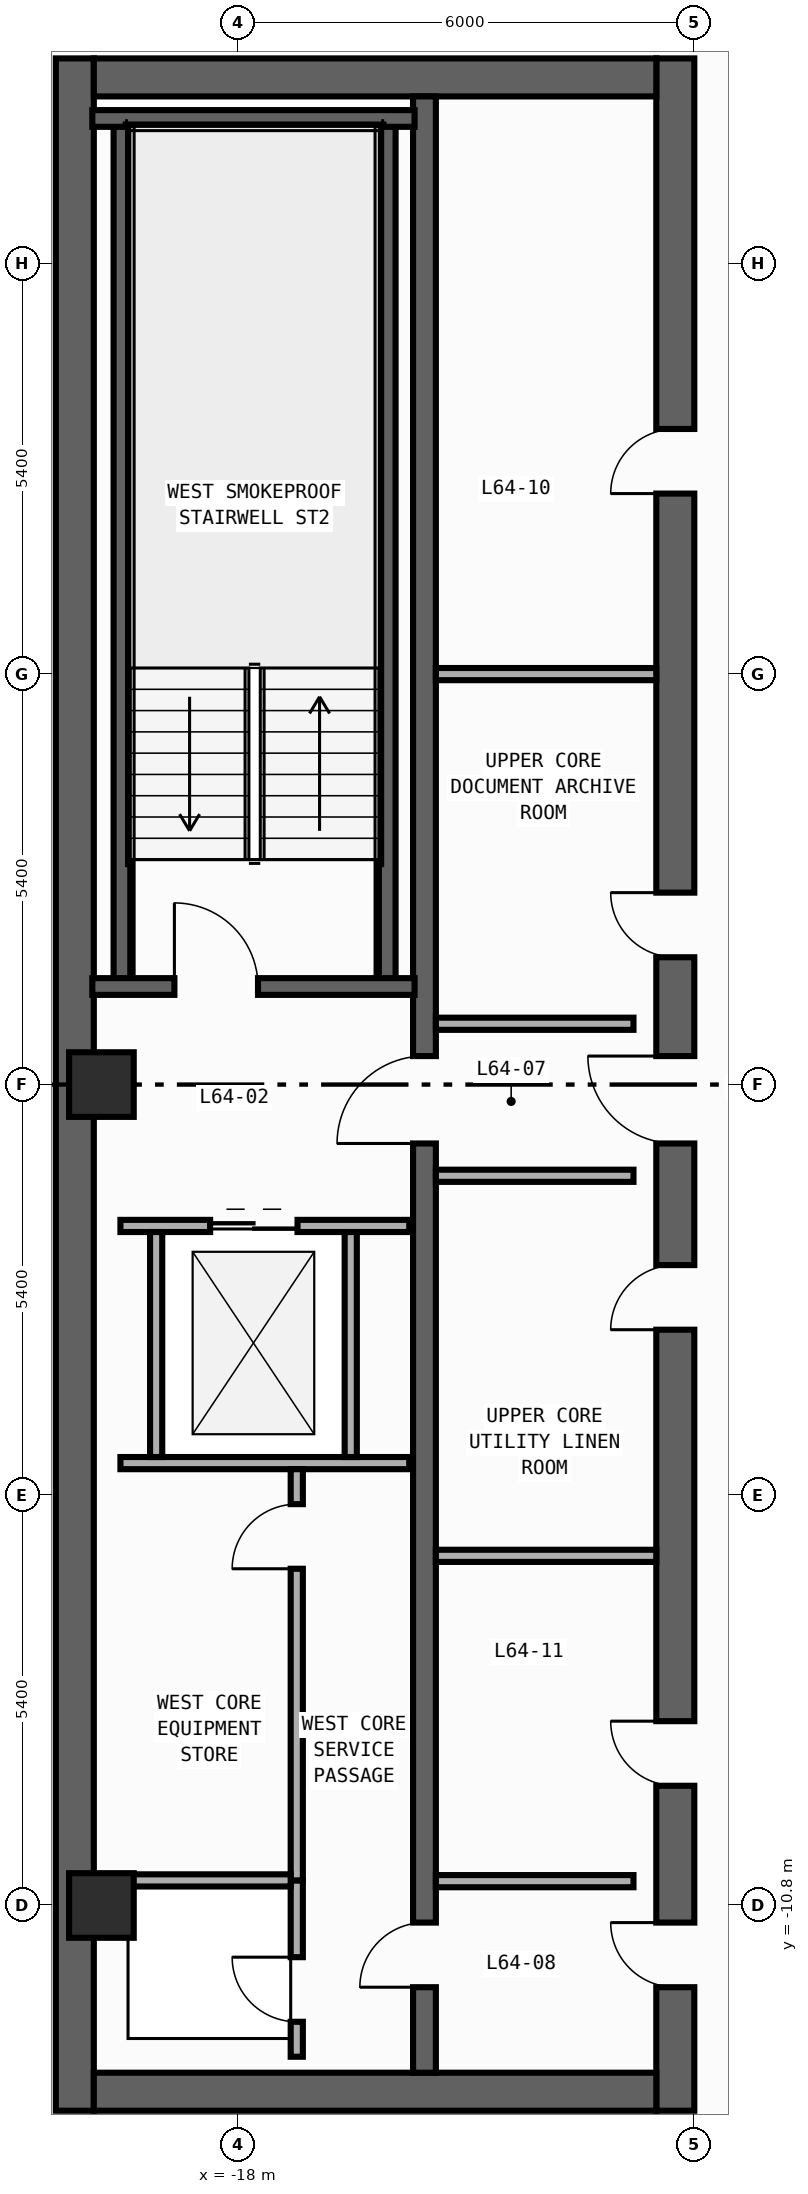
"""IFC4 building model, lengths in metres.
Left out: names, types, materials, properties, quantities, classifications, styles, units other than length and angle.
Written with IfcOpenShell. Run it as: python <this file> out.ifc"""

import sys

from ifc_helpers import new_model, si_unit, direction, frame, frame_2d, origin, origin_2d, place, context, subcontext, project, spatial, rectangle, extrude, element, fill, save


model = new_model("IFC4")
c1 = context("Model", 3, precision=1e-05, world=origin(), true_north=direction((0.0, 1.0)))
c2 = subcontext(c1, "Body", "Model", "MODEL_VIEW")
j1 = project(units=[si_unit("LENGTHUNIT", "METRE"), si_unit("PLANEANGLEUNIT", "RADIAN")], contexts=[c1])
p1 = place(None, origin())
s1 = spatial("IfcSite", under=j1, at=p1, CompositionType="ELEMENT")
p2 = place(p1, origin())
s2 = spatial("IfcBuilding", under=s1, at=p2, CompositionType="ELEMENT")
p3 = place(p2, frame((0.0, 0.0, 269.2)))
s3 = spatial("IfcBuildingStorey", under=s2, at=p3, CompositionType="ELEMENT", Elevation=269.2)
p4 = place(p3, frame((-20.15, -13.5, 0.0), z_axis=(0.0, 0.0, 1.0), x_axis=(0.0, 1.0, 0.0)))
e1 = element("IfcWall", 1, at=p4, inside=s3, PredefinedType="SHEAR", context=c2, shape_type="SweptSolid", body=[
    extrude(rectangle(XDim=27.0, YDim=0.5, at=frame_2d((13.5, 0.0))), origin(), (0.0, 0.0, 1.0), 3.25),
])
p5 = place(p3, frame((-12.25, -13.5, 0.0), z_axis=(0.0, 0.0, 1.0), x_axis=(0.0, 1.0, 0.0)))
e2 = element("IfcWall", 2, at=p5, inside=s3, PredefinedType="SHEAR", context=c2, shape_type="SweptSolid", body=[
    extrude(rectangle(XDim=27.0, YDim=0.5, at=frame_2d((13.5, 0.0))), origin(), (0.0, 0.0, 1.0), 3.25),
])
p6 = place(p5, frame((15.175, 0.0, 0.0)))
e3 = element("IfcOpeningElement", 3, at=p6, cuts=e2, PredefinedType="OPENING", context=c2, shape_type="SweptSolid", body=[
    extrude(rectangle(XDim=0.85, YDim=2.1, at=frame_2d((0.425, 1.05))), frame((0.0, 0.26, 0.0), z_axis=(0.0, -1.0, 0.0), x_axis=(1.0, 0.0, 0.0)), (0.0, 0.0, 1.0), 0.52),
])
p7 = place(p5, frame((21.275, 0.0, 0.0)))
e4 = element("IfcOpeningElement", 4, at=p7, cuts=e2, PredefinedType="OPENING", context=c2, shape_type="SweptSolid", body=[
    extrude(rectangle(XDim=0.85, YDim=2.1, at=frame_2d((0.425, 1.05))), frame((0.0, 0.26, 0.0), z_axis=(0.0, -1.0, 0.0), x_axis=(1.0, 0.0, 0.0)), (0.0, 0.0, 1.0), 0.52),
])
p8 = place(p5, frame((4.275, 0.0, 0.0)))
e5 = element("IfcOpeningElement", 5, at=p8, cuts=e2, PredefinedType="OPENING", context=c2, shape_type="SweptSolid", body=[
    extrude(rectangle(XDim=0.85, YDim=2.1, at=frame_2d((0.425, 1.05))), frame((0.0, 0.26, 0.0), z_axis=(0.0, -1.0, 0.0), x_axis=(1.0, 0.0, 0.0)), (0.0, 0.0, 1.0), 0.52),
])
p9 = place(p5, frame((10.275, 0.0, 0.0)))
e6 = element("IfcOpeningElement", 6, at=p9, cuts=e2, PredefinedType="OPENING", context=c2, shape_type="SweptSolid", body=[
    extrude(rectangle(XDim=0.85, YDim=2.1, at=frame_2d((0.425, 1.05))), frame((0.0, 0.26, 0.0), z_axis=(0.0, -1.0, 0.0), x_axis=(1.0, 0.0, 0.0)), (0.0, 0.0, 1.0), 0.52),
])
p10 = place(p5, frame((12.725, 0.0, 0.0)))
e7 = element("IfcOpeningElement", 7, at=p10, cuts=e2, PredefinedType="OPENING", context=c2, shape_type="SweptSolid", body=[
    extrude(rectangle(XDim=1.15, YDim=2.2, at=frame_2d((0.575, 1.1))), frame((0.0, 0.26, 0.0), z_axis=(0.0, -1.0, 0.0), x_axis=(1.0, 0.0, 0.0)), (0.0, 0.0, 1.0), 0.52),
])
p11 = place(p5, frame((1.625, 0.0, 0.0)))
e8 = element("IfcOpeningElement", 8, at=p11, cuts=e2, PredefinedType="OPENING", context=c2, shape_type="SweptSolid", body=[
    extrude(rectangle(XDim=0.85, YDim=2.1, at=frame_2d((0.425, 1.05))), frame((0.0, 0.26, 0.0), z_axis=(0.0, -1.0, 0.0), x_axis=(1.0, 0.0, 0.0)), (0.0, 0.0, 1.0), 0.52),
])
for number, where, z_axis, x_axis in (
    (9, (-19.9, -13.25, 0.0), (0.0, 0.0, 1.0), (1.0, 0.0, 0.0)),
    (10, (-19.9, 13.25, 0.0), (0.0, 0.0, 1.0), (1.0, 0.0, 0.0)),
):
    element("IfcWall", number, at=place(p3, frame(where, z_axis=z_axis, x_axis=x_axis)), inside=s3, PredefinedType="SHEAR", context=c2, shape_type="SweptSolid", body=[
        extrude(rectangle(XDim=7.4, YDim=0.5, at=frame_2d((3.7, 0.0))), origin(), (0.0, 0.0, 1.0), 3.25),
    ])
p12 = place(p3, frame((-15.55, -13.0, 0.0), z_axis=(0.0, 0.0, 1.0), x_axis=(0.0, 1.0, 0.0)))
e11 = element("IfcWall", 11, at=p12, inside=s3, PredefinedType="SHEAR", context=c2, shape_type="SweptSolid", body=[
    extrude(rectangle(XDim=26.0, YDim=0.3, at=frame_2d((13.0, 0.0))), origin(), (0.0, 0.0, 1.0), 3.25),
])
p13 = place(p12, frame((12.225, 0.0, 0.0)))
e12 = element("IfcOpeningElement", 12, at=p13, cuts=e11, PredefinedType="OPENING", context=c2, shape_type="SweptSolid", body=[
    extrude(rectangle(XDim=1.15, YDim=2.2, at=frame_2d((0.575, 1.1))), frame((0.0, 0.16, 0.0), z_axis=(0.0, -1.0, 0.0), x_axis=(1.0, 0.0, 0.0)), (0.0, 0.0, 1.0), 0.32),
])
p14 = place(p12, frame((1.125, 0.0, 0.0)))
e13 = element("IfcOpeningElement", 13, at=p14, cuts=e11, PredefinedType="OPENING", context=c2, shape_type="SweptSolid", body=[
    extrude(rectangle(XDim=0.85, YDim=2.1, at=frame_2d((0.425, 1.05))), frame((0.0, 0.16, 0.0), z_axis=(0.0, -1.0, 0.0), x_axis=(1.0, 0.0, 0.0)), (0.0, 0.0, 1.0), 0.32),
])
for number, where, z_axis, x_axis in (
    (14, (-16.04, 1.29, 0.0), (0.0, 0.0, 1.0), (0.0, 1.0, 0.0)),
    (15, (-19.53, 1.29, 0.0), (0.0, 0.0, 1.0), (0.0, 1.0, 0.0)),
):
    element("IfcWall", number, at=place(p3, frame(where, z_axis=z_axis, x_axis=x_axis)), inside=s3, PredefinedType="SHEAR", context=c2, shape_type="SweptSolid", body=[
        extrude(rectangle(XDim=11.42, YDim=0.22, at=frame_2d((5.71, 0.0))), origin(), (0.0, 0.0, 1.0), 3.25),
    ])
p15 = place(p3, frame((-19.92, 12.71, 0.0), z_axis=(0.0, 0.0, 1.0), x_axis=(1.0, 0.0, 0.0)))
e16 = element("IfcWall", 16, at=p15, inside=s3, PredefinedType="SHEAR", context=c2, shape_type="SweptSolid", body=[
    extrude(rectangle(XDim=4.24, YDim=0.22, at=frame_2d((2.12, 0.0))), origin(), (0.0, 0.0, 1.0), 3.25),
])
p16 = place(p3, frame((-19.92, 1.29, 0.0), z_axis=(0.0, 0.0, 1.0), x_axis=(1.0, 0.0, 0.0)))
e17 = element("IfcWall", 17, at=p16, inside=s3, PredefinedType="SHEAR", context=c2, shape_type="SweptSolid", body=[
    extrude(rectangle(XDim=4.24, YDim=0.22, at=frame_2d((2.12, 0.0))), origin(), (0.0, 0.0, 1.0), 3.25),
])
p17 = place(p16, frame((1.08, 0.0, 0.0)))
e18 = element("IfcOpeningElement", 18, at=p17, cuts=e17, PredefinedType="OPENING", context=c2, shape_type="SweptSolid", body=[
    extrude(rectangle(XDim=1.1, YDim=2.2, at=frame_2d((0.55, 1.1))), frame((0.0, 0.12, 0.0), z_axis=(0.0, -1.0, 0.0), x_axis=(1.0, 0.0, 0.0)), (0.0, 0.0, 1.0), 0.24),
])
for number, where, z_axis, x_axis in (
    (19, (-19.8, -10.8, 0.0), (0.0, 0.0, 1.0), (1.0, 0.0, 0.0)),
    (20, (-19.8, 0.0, 0.0), (0.0, 0.0, 1.0), (1.0, 0.0, 0.0)),
):
    element("IfcColumn", number, at=place(p3, frame(where, z_axis=z_axis, x_axis=x_axis)), inside=s3, PredefinedType="COLUMN", context=c2, shape_type="SweptSolid", body=[
        extrude(rectangle(XDim=0.85, YDim=0.85, at=origin_2d()), origin(), (0.0, 0.0, 1.0), 3.6),
    ])
p18 = place(p3, frame((-19.55, -1.86, 0.0), z_axis=(0.0, 0.0, 1.0), x_axis=(1.0, 0.0, 0.0)))
e21 = element("IfcWall", 21, at=p18, inside=s3, PredefinedType="STANDARD", context=c2, shape_type="SweptSolid", body=[
    extrude(rectangle(XDim=3.8, YDim=0.16, at=frame_2d((1.9, 0.0))), origin(), (0.0, 0.0, 1.0), 3.25),
])
p19 = place(p18, frame((1.18, 0.0, 0.0)))
e22 = element("IfcOpeningElement", 22, at=p19, cuts=e21, PredefinedType="OPENING", context=c2, shape_type="SweptSolid", body=[
    extrude(rectangle(XDim=1.15, YDim=2.2, at=frame_2d((0.575, 1.1))), frame((0.0, 0.09, 0.0), z_axis=(0.0, -1.0, 0.0), x_axis=(1.0, 0.0, 0.0)), (0.0, 0.0, 1.0), 0.18),
])
p20 = place(p3, frame((-19.55, -4.98, 0.0), z_axis=(0.0, 0.0, 1.0), x_axis=(1.0, 0.0, 0.0)))
e23 = element("IfcWall", 23, at=p20, inside=s3, PredefinedType="STANDARD", context=c2, shape_type="SweptSolid", body=[
    extrude(rectangle(XDim=3.8, YDim=0.16, at=frame_2d((1.9, 0.0))), origin(), (0.0, 0.0, 1.0), 3.25),
])
for number, where, z_axis, x_axis in (
    (24, (-19.08, -4.9, 0.0), (0.0, 0.0, 1.0), (0.0, 1.0, 0.0)),
    (25, (-16.52, -4.9, 0.0), (0.0, 0.0, 1.0), (0.0, 1.0, 0.0)),
):
    element("IfcWall", number, at=place(p3, frame(where, z_axis=z_axis, x_axis=x_axis)), inside=s3, PredefinedType="STANDARD", context=c2, shape_type="SweptSolid", body=[
        extrude(rectangle(XDim=2.96, YDim=0.16, at=frame_2d((1.48, 0.0))), origin(), (0.0, 0.0, 1.0), 3.25),
    ])
for number, where, z_axis, x_axis in (
    (26, (-15.4, 0.8, 0.0), (0.0, 0.0, 1.0), (1.0, 0.0, 0.0)),
    (27, (-15.4, -1.2, 0.0), (0.0, 0.0, 1.0), (1.0, 0.0, 0.0)),
    (28, (-15.4, -10.48, 0.0), (0.0, 0.0, 1.0), (1.0, 0.0, 0.0)),
):
    element("IfcWall", number, at=place(p3, frame(where, z_axis=z_axis, x_axis=x_axis)), inside=s3, PredefinedType="STANDARD", context=c2, shape_type="SweptSolid", body=[
        extrude(rectangle(XDim=2.6, YDim=0.16, at=frame_2d((1.3, 0.0))), origin(), (0.0, 0.0, 1.0), 3.25),
    ])
p21 = place(p3, frame((-17.23, -12.79, 0.0), z_axis=(0.0, 0.0, 1.0), x_axis=(0.0, 1.0, 0.0)))
e29 = element("IfcWall", 29, at=p21, inside=s3, PredefinedType="PARTITIONING", context=c2, shape_type="SweptSolid", body=[
    extrude(rectangle(XDim=2.32, YDim=0.16, at=frame_2d((1.16, 0.0))), origin(), (0.0, 0.0, 1.0), 3.25),
])
p22 = place(p21, frame((0.46, 0.0, 0.0)))
e30 = element("IfcOpeningElement", 30, at=p22, cuts=e29, PredefinedType="OPENING", context=c2, shape_type="SweptSolid", body=[
    extrude(rectangle(XDim=0.85, YDim=2.1, at=frame_2d((0.425, 1.05))), frame((0.0, 0.09, 0.0), z_axis=(0.0, -1.0, 0.0), x_axis=(1.0, 0.0, 0.0)), (0.0, 0.0, 1.0), 0.18),
])
p23 = place(p3, frame((-17.23, -10.47, 0.0), z_axis=(0.0, 0.0, 1.0), x_axis=(0.0, 1.0, 0.0)))
e31 = element("IfcWall", 31, at=p23, inside=s3, PredefinedType="PARTITIONING", context=c2, shape_type="SweptSolid", body=[
    extrude(rectangle(XDim=5.41, YDim=0.16, at=frame_2d((2.705, 0.0))), origin(), (0.0, 0.0, 1.0), 3.25),
])
p24 = place(p23, frame((4.1, 0.0, 0.0)))
e32 = element("IfcOpeningElement", 32, at=p24, cuts=e31, PredefinedType="OPENING", context=c2, shape_type="SweptSolid", body=[
    extrude(rectangle(XDim=0.85, YDim=2.1, at=frame_2d((0.425, 1.05))), frame((0.0, 0.09, 0.0), z_axis=(0.0, -1.0, 0.0), x_axis=(1.0, 0.0, 0.0)), (0.0, 0.0, 1.0), 0.18),
])
p25 = place(p3, frame((-19.75, -10.47, 0.0), z_axis=(0.0, 0.0, 1.0), x_axis=(1.0, 0.0, 0.0)))
e33 = element("IfcWall", 33, at=p25, inside=s3, PredefinedType="PARTITIONING", context=c2, shape_type="SweptSolid", body=[
    extrude(rectangle(XDim=2.44, YDim=0.16, at=frame_2d((1.22, 0.0))), origin(), (0.0, 0.0, 1.0), 3.25),
])
for number, where, z_axis, x_axis in (
    (34, (-15.4, 5.4, 0.0), (0.0, 0.0, 1.0), (1.0, 0.0, 0.0)),
    (35, (-15.4, -6.2, 0.0), (0.0, 0.0, 1.0), (1.0, 0.0, 0.0)),
):
    element("IfcWall", number, at=place(p3, frame(where, z_axis=z_axis, x_axis=x_axis)), inside=s3, PredefinedType="PARTITIONING", context=c2, shape_type="SweptSolid", body=[
        extrude(rectangle(XDim=2.9, YDim=0.16, at=frame_2d((1.45, 0.0))), origin(), (0.0, 0.0, 1.0), 3.25),
    ])
p26 = place(p17, origin())
e36 = element("IfcDoor", 36, at=p26, inside=s3, OperationType="SINGLE_SWING_LEFT", PredefinedType="DOOR", context=c2, shape_type="SweptSolid", body=[
    extrude(rectangle(XDim=1.1, YDim=2.2, at=frame_2d((0.55, 1.1))), frame((0.0, 0.025, 0.0), z_axis=(0.0, -1.0, 0.0), x_axis=(1.0, 0.0, 0.0)), (0.0, 0.0, 1.0), 0.05),
])
fill(e18, e36)
p27 = place(p6, origin())
e37 = element("IfcDoor", 37, at=p27, inside=s3, OperationType="SINGLE_SWING_RIGHT", PredefinedType="DOOR", context=c2, shape_type="SweptSolid", body=[
    extrude(rectangle(XDim=0.85, YDim=2.1, at=frame_2d((0.425, 1.05))), frame((0.0, 0.025, 0.0), z_axis=(0.0, -1.0, 0.0), x_axis=(1.0, 0.0, 0.0)), (0.0, 0.0, 1.0), 0.05),
])
fill(e3, e37)
p28 = place(p7, origin())
e38 = element("IfcDoor", 38, at=p28, inside=s3, OperationType="SINGLE_SWING_LEFT", PredefinedType="DOOR", context=c2, shape_type="SweptSolid", body=[
    extrude(rectangle(XDim=0.85, YDim=2.1, at=frame_2d((0.425, 1.05))), frame((0.0, 0.025, 0.0), z_axis=(0.0, -1.0, 0.0), x_axis=(1.0, 0.0, 0.0)), (0.0, 0.0, 1.0), 0.05),
])
fill(e4, e38)
p29 = place(p8, origin())
e39 = element("IfcDoor", 39, at=p29, inside=s3, OperationType="SINGLE_SWING_RIGHT", PredefinedType="DOOR", context=c2, shape_type="SweptSolid", body=[
    extrude(rectangle(XDim=0.85, YDim=2.1, at=frame_2d((0.425, 1.05))), frame((0.0, 0.025, 0.0), z_axis=(0.0, -1.0, 0.0), x_axis=(1.0, 0.0, 0.0)), (0.0, 0.0, 1.0), 0.05),
])
fill(e5, e39)
p30 = place(p9, origin())
e40 = element("IfcDoor", 40, at=p30, inside=s3, OperationType="SINGLE_SWING_LEFT", PredefinedType="DOOR", context=c2, shape_type="SweptSolid", body=[
    extrude(rectangle(XDim=0.85, YDim=2.1, at=frame_2d((0.425, 1.05))), frame((0.0, 0.025, 0.0), z_axis=(0.0, -1.0, 0.0), x_axis=(1.0, 0.0, 0.0)), (0.0, 0.0, 1.0), 0.05),
])
fill(e6, e40)
p31 = place(p10, origin())
e41 = element("IfcDoor", 41, at=p31, inside=s3, OperationType="SINGLE_SWING_RIGHT", PredefinedType="DOOR", context=c2, shape_type="SweptSolid", body=[
    extrude(rectangle(XDim=1.15, YDim=2.2, at=frame_2d((0.575, 1.1))), frame((0.0, 0.025, 0.0), z_axis=(0.0, -1.0, 0.0), x_axis=(1.0, 0.0, 0.0)), (0.0, 0.0, 1.0), 0.05),
])
fill(e7, e41)
p32 = place(p13, origin())
e42 = element("IfcDoor", 42, at=p32, inside=s3, OperationType="SINGLE_SWING_LEFT", PredefinedType="DOOR", context=c2, shape_type="SweptSolid", body=[
    extrude(rectangle(XDim=1.15, YDim=2.2, at=frame_2d((0.575, 1.1))), frame((0.0, 0.025, 0.0), z_axis=(0.0, -1.0, 0.0), x_axis=(1.0, 0.0, 0.0)), (0.0, 0.0, 1.0), 0.05),
])
fill(e12, e42)
p33 = place(p11, origin())
e43 = element("IfcDoor", 43, at=p33, inside=s3, OperationType="SINGLE_SWING_RIGHT", PredefinedType="DOOR", context=c2, shape_type="SweptSolid", body=[
    extrude(rectangle(XDim=0.85, YDim=2.1, at=frame_2d((0.425, 1.05))), frame((0.0, 0.025, 0.0), z_axis=(0.0, -1.0, 0.0), x_axis=(1.0, 0.0, 0.0)), (0.0, 0.0, 1.0), 0.05),
])
fill(e8, e43)
p34 = place(p14, origin())
e44 = element("IfcDoor", 44, at=p34, inside=s3, OperationType="SINGLE_SWING_LEFT", PredefinedType="DOOR", context=c2, shape_type="SweptSolid", body=[
    extrude(rectangle(XDim=0.85, YDim=2.1, at=frame_2d((0.425, 1.05))), frame((0.0, 0.025, 0.0), z_axis=(0.0, -1.0, 0.0), x_axis=(1.0, 0.0, 0.0)), (0.0, 0.0, 1.0), 0.05),
])
fill(e13, e44)
p35 = place(p19, origin())
e45 = element("IfcDoor", 45, at=p35, inside=s3, OperationType="DOUBLE_DOOR_SLIDING", PredefinedType="DOOR", context=c2, shape_type="SweptSolid", body=[
    extrude(rectangle(XDim=1.15, YDim=2.2, at=frame_2d((0.575, 1.1))), frame((0.0, 0.025, 0.0), z_axis=(0.0, -1.0, 0.0), x_axis=(1.0, 0.0, 0.0)), (0.0, 0.0, 1.0), 0.05),
])
fill(e22, e45)
p36 = place(p22, origin())
e46 = element("IfcDoor", 46, at=p36, inside=s3, OperationType="SINGLE_SWING_RIGHT", PredefinedType="DOOR", context=c2, shape_type="SweptSolid", body=[
    extrude(rectangle(XDim=0.85, YDim=2.1, at=frame_2d((0.425, 1.05))), frame((0.0, 0.025, 0.0), z_axis=(0.0, -1.0, 0.0), x_axis=(1.0, 0.0, 0.0)), (0.0, 0.0, 1.0), 0.05),
])
fill(e30, e46)
p37 = place(p24, origin())
e47 = element("IfcDoor", 47, at=p37, inside=s3, OperationType="SINGLE_SWING_LEFT", PredefinedType="DOOR", context=c2, shape_type="SweptSolid", body=[
    extrude(rectangle(XDim=0.85, YDim=2.1, at=frame_2d((0.425, 1.05))), frame((0.0, 0.025, 0.0), z_axis=(0.0, -1.0, 0.0), x_axis=(1.0, 0.0, 0.0)), (0.0, 0.0, 1.0), 0.05),
])
fill(e32, e47)
save(model, sys.argv[1])
